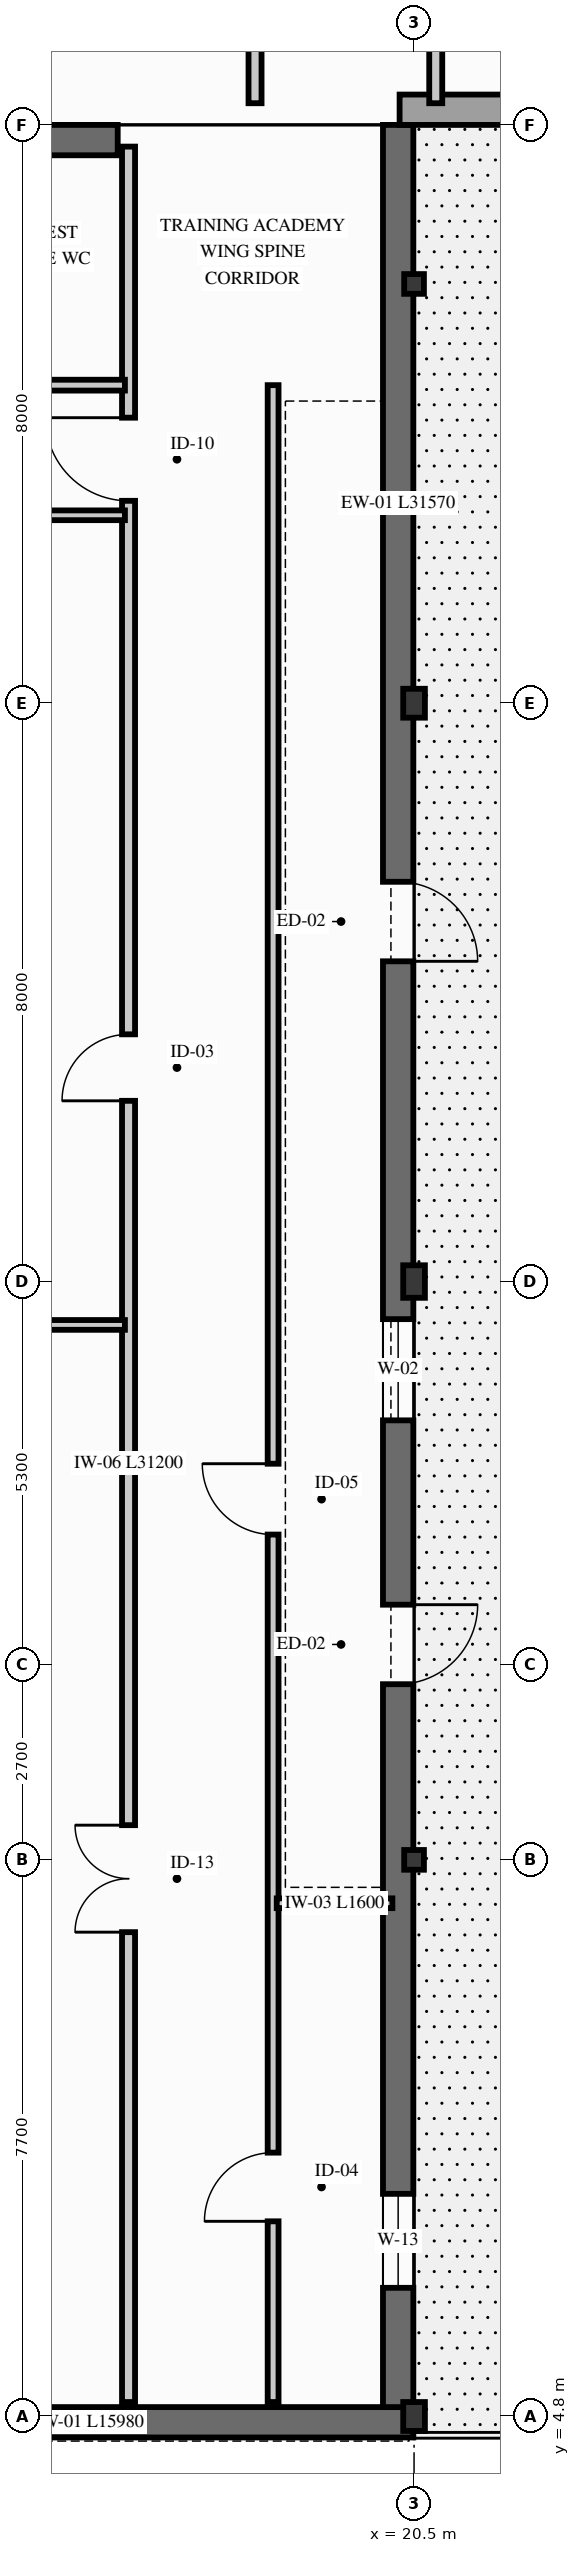
"""IFC4 building model, lengths in metres.
Left out: names, types, materials, properties, quantities, classifications, styles, units other than length and angle.
Written with IfcOpenShell. Run it as: python <this file> out.ifc"""

import sys

from ifc_helpers import new_model, si_unit, direction, frame, frame_2d, origin, origin_2d, place, context, subcontext, project, spatial, rectangle, hollow_circle, i_section, extrude, element, fill, save


model = new_model("IFC4")
c1 = context("Model", 3, precision=1e-05, world=origin(), true_north=direction((0.0, 1.0)))
c2 = subcontext(c1, "Body", "Model", "MODEL_VIEW")
j1 = project(units=[si_unit("LENGTHUNIT", "METRE"), si_unit("PLANEANGLEUNIT", "RADIAN")], contexts=[c1])
p1 = place(None, origin())
s1 = spatial("IfcSite", under=j1, at=p1, CompositionType="ELEMENT")
p2 = place(p1, origin())
s2 = spatial("IfcBuilding", under=s1, at=p2, CompositionType="ELEMENT")
p3 = place(p2, frame((0.0, 0.0, 13.5)))
s3 = spatial("IfcBuildingStorey", under=s2, at=p3, CompositionType="ELEMENT", Elevation=13.5)
p4 = place(p3, frame((20.5, 4.8, 0.0), z_axis=(0.0, 0.0, 1.0), x_axis=(1.0, 0.0, 0.0)))
e1 = element("IfcColumn", 1, at=p4, inside=s3, PredefinedType="COLUMN", context=c2, shape_type="SweptSolid", body=[
    extrude(i_section(OverallWidth=0.3, OverallDepth=0.4, WebThickness=0.013, FlangeThickness=0.024, FilletRadius=0.027, at=origin_2d()), origin(), (0.0, 0.0, 1.0), 3.94),
])
p5 = place(p3, frame((20.5, 12.5, 0.0), z_axis=(0.0, 0.0, 1.0), x_axis=(1.0, 0.0, 0.0)))
e2 = element("IfcColumn", 2, at=p5, inside=s3, PredefinedType="COLUMN", context=c2, shape_type="SweptSolid", body=[
    extrude(hollow_circle(Radius=0.136, WallThickness=0.012, at=origin_2d()), origin(), (0.0, 0.0, 1.0), 3.94),
])
p6 = place(p3, frame((20.5, 20.5, 0.0), z_axis=(0.0, 0.0, 1.0), x_axis=(1.0, 0.0, 0.0)))
e3 = element("IfcColumn", 3, at=p6, inside=s3, PredefinedType="COLUMN", context=c2, shape_type="SweptSolid", body=[
    extrude(i_section(OverallWidth=0.3, OverallDepth=0.45, WebThickness=0.014, FlangeThickness=0.026, FilletRadius=0.027, at=origin_2d()), origin(), (0.0, 0.0, 1.0), 3.94),
])
p7 = place(p3, frame((20.5, 28.5, 0.0), z_axis=(0.0, 0.0, 1.0), x_axis=(1.0, 0.0, 0.0)))
e4 = element("IfcColumn", 4, at=p7, inside=s3, PredefinedType="COLUMN", context=c2, shape_type="SweptSolid", body=[
    extrude(i_section(OverallWidth=0.3, OverallDepth=0.4, WebThickness=0.013, FlangeThickness=0.024, FilletRadius=0.027, at=origin_2d()), origin(), (0.0, 0.0, 1.0), 3.94),
])
p8 = place(p3, frame((20.5, 34.3, 0.0), z_axis=(0.0, 0.0, 1.0), x_axis=(1.0, 0.0, 0.0)))
e5 = element("IfcColumn", 5, at=p8, inside=s3, PredefinedType="COLUMN", context=c2, shape_type="SweptSolid", body=[
    extrude(hollow_circle(Radius=0.136, WallThickness=0.012, at=origin_2d()), origin(), (0.0, 0.0, 1.0), 3.94),
])
p9 = place(p3, frame((4.51, 4.72, 0.0), z_axis=(0.0, 0.0, 1.0), x_axis=(1.0, 0.0, 0.0)))
e6 = element("IfcWall", 6, at=p9, inside=s3, PredefinedType="SOLIDWALL", context=c2, shape_type="SweptSolid", body=[
    extrude(rectangle(XDim=15.98, YDim=0.42, at=frame_2d((7.99, 0.0))), origin(), (0.0, 0.0, 1.0), 3.9),
])
p10 = place(p9, frame((1.65, 0.0, 0.85)))
e7 = element("IfcOpeningElement", 7, at=p10, cuts=e6, PredefinedType="OPENING", context=c2, shape_type="SweptSolid", body=[
    extrude(rectangle(XDim=1.3, YDim=2.15, at=frame_2d((0.65, 1.075))), frame((0.0, 0.22, 0.0), z_axis=(0.0, -1.0, 0.0), x_axis=(1.0, 0.0, 0.0)), (0.0, 0.0, 1.0), 0.44),
])
p11 = place(p9, frame((5.45, 0.0, 0.85)))
e8 = element("IfcOpeningElement", 8, at=p11, cuts=e6, PredefinedType="OPENING", context=c2, shape_type="SweptSolid", body=[
    extrude(rectangle(XDim=1.5, YDim=2.3, at=frame_2d((0.75, 1.15))), frame((0.0, 0.22, 0.0), z_axis=(0.0, -1.0, 0.0), x_axis=(1.0, 0.0, 0.0)), (0.0, 0.0, 1.0), 0.44),
])
p12 = place(p3, frame((20.28, 4.93, 0.0), z_axis=(0.0, 0.0, 1.0), x_axis=(0.0, 1.0, 0.0)))
e9 = element("IfcWall", 9, at=p12, inside=s3, PredefinedType="SOLIDWALL", context=c2, shape_type="SweptSolid", body=[
    extrude(rectangle(XDim=31.57, YDim=0.42, at=frame_2d((15.785, 0.0))), origin(), (0.0, 0.0, 1.0), 3.9),
])
p13 = place(p12, frame((11.1, 0.0, 0.0), z_axis=(0.0, 0.0, 1.0), x_axis=(-1.0, 0.0, 0.0)))
e10 = element("IfcOpeningElement", 10, at=p13, cuts=e9, PredefinedType="OPENING", context=c2, shape_type="SweptSolid", body=[
    extrude(rectangle(XDim=1.1, YDim=2.25, at=frame_2d((0.55, 1.125))), frame((0.0, 0.22, 0.0), z_axis=(0.0, -1.0, 0.0), x_axis=(1.0, 0.0, 0.0)), (0.0, 0.0, 1.0), 0.44),
])
p14 = place(p12, frame((21.1, 0.0, 0.0), z_axis=(0.0, 0.0, 1.0), x_axis=(-1.0, 0.0, 0.0)))
e11 = element("IfcOpeningElement", 11, at=p14, cuts=e9, PredefinedType="OPENING", context=c2, shape_type="SweptSolid", body=[
    extrude(rectangle(XDim=1.1, YDim=2.25, at=frame_2d((0.55, 1.125))), frame((0.0, 0.22, 0.0), z_axis=(0.0, -1.0, 0.0), x_axis=(1.0, 0.0, 0.0)), (0.0, 0.0, 1.0), 0.44),
])
p15 = place(p12, frame((1.65, 0.0, 0.85)))
e12 = element("IfcOpeningElement", 12, at=p15, cuts=e9, PredefinedType="OPENING", context=c2, shape_type="SweptSolid", body=[
    extrude(rectangle(XDim=1.3, YDim=2.15, at=frame_2d((0.65, 1.075))), frame((0.0, 0.22, 0.0), z_axis=(0.0, -1.0, 0.0), x_axis=(1.0, 0.0, 0.0)), (0.0, 0.0, 1.0), 0.44),
])
p16 = place(p12, frame((13.65, 0.0, 0.85)))
e13 = element("IfcOpeningElement", 13, at=p16, cuts=e9, PredefinedType="OPENING", context=c2, shape_type="SweptSolid", body=[
    extrude(rectangle(XDim=1.4, YDim=2.2, at=frame_2d((0.7, 1.1))), frame((0.0, 0.22, 0.0), z_axis=(0.0, -1.0, 0.0), x_axis=(1.0, 0.0, 0.0)), (0.0, 0.0, 1.0), 0.44),
])
p17 = place(p3, frame((4.72, 36.29, 0.0), z_axis=(0.0, 0.0, 1.0), x_axis=(1.0, 0.0, 0.0)))
e14 = element("IfcWall", 14, at=p17, inside=s3, PredefinedType="SOLIDWALL", context=c2, shape_type="SweptSolid", body=[
    extrude(rectangle(XDim=11.68, YDim=0.42, at=frame_2d((5.84, 0.0))), origin(), (0.0, 0.0, 1.0), 3.9),
])
p18 = place(p3, frame((20.3, 36.71, 0.0), z_axis=(0.0, 0.0, 1.0), x_axis=(1.0, 0.0, 0.0)))
e15 = element("IfcWall", 15, at=p18, inside=s3, PredefinedType="SOLIDWALL", context=c2, shape_type="SweptSolid", body=[
    extrude(rectangle(XDim=7.98, YDim=0.42, at=frame_2d((3.99, 0.0))), origin(), (0.0, 0.0, 1.0), 3.9),
])
p19 = place(p18, frame((4.3, 0.0, 0.0), z_axis=(0.0, 0.0, 1.0), x_axis=(-1.0, 0.0, 0.0)))
e16 = element("IfcOpeningElement", 16, at=p19, cuts=e15, PredefinedType="OPENING", context=c2, shape_type="SweptSolid", body=[
    extrude(rectangle(XDim=1.1, YDim=2.25, at=frame_2d((0.55, 1.125))), frame((0.0, 0.22, 0.0), z_axis=(0.0, -1.0, 0.0), x_axis=(1.0, 0.0, 0.0)), (0.0, 0.0, 1.0), 0.44),
])
p20 = place(p3, frame((18.3, 36.8, 0.0), z_axis=(0.0, 0.0, 1.0), x_axis=(0.0, 1.0, 0.0)))
e17 = element("IfcWall", 17, at=p20, inside=s3, PredefinedType="PARTITIONING", context=c2, shape_type="SweptSolid", body=[
    extrude(rectangle(XDim=35.95, YDim=0.18, at=frame_2d((17.975, 0.0))), origin(), (0.0, 0.0, 1.0), 3.718),
])
p21 = place(p20, frame((7.0, 0.0, 0.0)))
e18 = element("IfcOpeningElement", 18, at=p21, cuts=e17, PredefinedType="OPENING", context=c2, shape_type="SweptSolid", body=[
    extrude(rectangle(XDim=1.02, YDim=2.18, at=frame_2d((0.51, 1.09))), frame((0.0, 0.1, 0.0), z_axis=(0.0, -1.0, 0.0), x_axis=(1.0, 0.0, 0.0)), (0.0, 0.0, 1.0), 0.2),
])
p22 = place(p20, frame((22.0, 0.0, 0.0)))
e19 = element("IfcOpeningElement", 19, at=p22, cuts=e17, PredefinedType="OPENING", context=c2, shape_type="SweptSolid", body=[
    extrude(rectangle(XDim=1.05, YDim=2.2, at=frame_2d((0.525, 1.1))), frame((0.0, 0.1, 0.0), z_axis=(0.0, -1.0, 0.0), x_axis=(1.0, 0.0, 0.0)), (0.0, 0.0, 1.0), 0.2),
])
p23 = place(p3, frame((20.8, 36.8, 0.0), z_axis=(0.0, 0.0, 1.0), x_axis=(0.0, 1.0, 0.0)))
e20 = element("IfcWall", 20, at=p23, inside=s3, PredefinedType="PARTITIONING", context=c2, shape_type="SweptSolid", body=[
    extrude(rectangle(XDim=38.05, YDim=0.18, at=frame_2d((19.025, 0.0))), origin(), (0.0, 0.0, 1.0), 3.718),
])
p24 = place(p23, frame((5.65, 0.0, 0.0)))
e21 = element("IfcOpeningElement", 21, at=p24, cuts=e20, PredefinedType="OPENING", context=c2, shape_type="SweptSolid", body=[
    extrude(rectangle(XDim=1.08, YDim=2.22, at=frame_2d((0.54, 1.11))), frame((0.0, 0.1, 0.0), z_axis=(0.0, -1.0, 0.0), x_axis=(1.0, 0.0, 0.0)), (0.0, 0.0, 1.0), 0.2),
])
p25 = place(p23, frame((20.0, 0.0, 0.0)))
e22 = element("IfcOpeningElement", 22, at=p25, cuts=e20, PredefinedType="OPENING", context=c2, shape_type="SweptSolid", body=[
    extrude(rectangle(XDim=1.05, YDim=2.2, at=frame_2d((0.525, 1.1))), frame((0.0, 0.1, 0.0), z_axis=(0.0, -1.0, 0.0), x_axis=(1.0, 0.0, 0.0)), (0.0, 0.0, 1.0), 0.2),
])
p26 = place(p3, frame((16.55, 5.0, 0.0), z_axis=(0.0, 0.0, 1.0), x_axis=(0.0, 1.0, 0.0)))
e23 = element("IfcWall", 23, at=p26, inside=s3, PredefinedType="PARTITIONING", context=c2, shape_type="SweptSolid", body=[
    extrude(rectangle(XDim=31.2, YDim=0.18, at=frame_2d((15.6, 0.0))), origin(), (0.0, 0.0, 1.0), 3.478),
])
p27 = place(p26, frame((6.5, 0.0, 0.0)))
e24 = element("IfcOpeningElement", 24, at=p27, cuts=e23, PredefinedType="OPENING", context=c2, shape_type="SweptSolid", body=[
    extrude(rectangle(XDim=1.48, YDim=2.28, at=frame_2d((0.74, 1.14))), frame((0.0, 0.1, 0.0), z_axis=(0.0, -1.0, 0.0), x_axis=(1.0, 0.0, 0.0)), (0.0, 0.0, 1.0), 0.2),
])
p28 = place(p26, frame((18.0, 0.0, 0.0)))
e25 = element("IfcOpeningElement", 25, at=p28, cuts=e23, PredefinedType="OPENING", context=c2, shape_type="SweptSolid", body=[
    extrude(rectangle(XDim=0.92, YDim=2.12, at=frame_2d((0.46, 1.06))), frame((0.0, 0.1, 0.0), z_axis=(0.0, -1.0, 0.0), x_axis=(1.0, 0.0, 0.0)), (0.0, 0.0, 1.0), 0.2),
])
p29 = place(p26, frame((26.3, 0.0, 0.0)))
e26 = element("IfcOpeningElement", 26, at=p29, cuts=e23, PredefinedType="OPENING", context=c2, shape_type="SweptSolid", body=[
    extrude(rectangle(XDim=1.15, YDim=2.2, at=frame_2d((0.575, 1.1))), frame((0.0, 0.1, 0.0), z_axis=(0.0, -1.0, 0.0), x_axis=(1.0, 0.0, 0.0)), (0.0, 0.0, 1.0), 0.2),
])
p30 = place(p3, frame((18.55, 5.0, 0.0), z_axis=(0.0, 0.0, 1.0), x_axis=(0.0, 1.0, 0.0)))
e27 = element("IfcWall", 27, at=p30, inside=s3, PredefinedType="PARTITIONING", context=c2, shape_type="SweptSolid", body=[
    extrude(rectangle(XDim=27.9, YDim=0.15, at=frame_2d((13.95, 0.0))), origin(), (0.0, 0.0, 1.0), 3.98),
])
p31 = place(p30, frame((2.5, 0.0, 0.0)))
e28 = element("IfcOpeningElement", 28, at=p31, cuts=e27, PredefinedType="OPENING", context=c2, shape_type="SweptSolid", body=[
    extrude(rectangle(XDim=0.95, YDim=2.15, at=frame_2d((0.475, 1.075))), frame((0.0, 0.085, 0.0), z_axis=(0.0, -1.0, 0.0), x_axis=(1.0, 0.0, 0.0)), (0.0, 0.0, 1.0), 0.17),
])
p32 = place(p30, frame((12.0, 0.0, 0.0)))
e29 = element("IfcOpeningElement", 29, at=p32, cuts=e27, PredefinedType="OPENING", context=c2, shape_type="SweptSolid", body=[
    extrude(rectangle(XDim=0.98, YDim=2.16, at=frame_2d((0.49, 1.08))), frame((0.0, 0.085, 0.0), z_axis=(0.0, -1.0, 0.0), x_axis=(1.0, 0.0, 0.0)), (0.0, 0.0, 1.0), 0.17),
])
p33 = place(p3, frame((5.0, 19.9, 0.0), z_axis=(0.0, 0.0, 1.0), x_axis=(1.0, 0.0, 0.0)))
e30 = element("IfcWall", 30, at=p33, inside=s3, PredefinedType="PARTITIONING", context=c2, shape_type="SweptSolid", body=[
    extrude(rectangle(XDim=11.5, YDim=0.135, at=frame_2d((5.75, 0.0))), origin(), (0.0, 0.0, 1.0), 3.378),
])
p34 = place(p3, frame((18.6, 11.9, 0.0), z_axis=(0.0, 0.0, 1.0), x_axis=(1.0, 0.0, 0.0)))
e31 = element("IfcWall", 31, at=p34, inside=s3, PredefinedType="PARTITIONING", context=c2, shape_type="SweptSolid", body=[
    extrude(rectangle(XDim=1.6, YDim=0.135, at=frame_2d((0.8, 0.0))), origin(), (0.0, 0.0, 1.0), 3.98),
])
p35 = place(p3, frame((5.0, 32.9, 0.0), z_axis=(0.0, 0.0, 1.0), x_axis=(1.0, 0.0, 0.0)))
e32 = element("IfcWall", 32, at=p35, inside=s3, PredefinedType="PARTITIONING", context=c2, shape_type="SweptSolid", body=[
    extrude(rectangle(XDim=11.5, YDim=0.15, at=frame_2d((5.75, 0.0))), origin(), (0.0, 0.0, 1.0), 3.378),
])
p36 = place(p35, frame((2.0, 0.0, 0.0)))
e33 = element("IfcOpeningElement", 33, at=p36, cuts=e32, PredefinedType="OPENING", context=c2, shape_type="SweptSolid", body=[
    extrude(rectangle(XDim=0.88, YDim=2.1, at=frame_2d((0.44, 1.05))), frame((0.0, 0.085, 0.0), z_axis=(0.0, -1.0, 0.0), x_axis=(1.0, 0.0, 0.0)), (0.0, 0.0, 1.0), 0.17),
])
p37 = place(p35, frame((8.4, 0.0, 0.0)))
e34 = element("IfcOpeningElement", 34, at=p37, cuts=e32, PredefinedType="OPENING", context=c2, shape_type="SweptSolid", body=[
    extrude(rectangle(XDim=0.9, YDim=2.1, at=frame_2d((0.45, 1.05))), frame((0.0, 0.085, 0.0), z_axis=(0.0, -1.0, 0.0), x_axis=(1.0, 0.0, 0.0)), (0.0, 0.0, 1.0), 0.17),
])
p38 = place(p3, frame((5.0, 31.1, 0.0), z_axis=(0.0, 0.0, 1.0), x_axis=(1.0, 0.0, 0.0)))
e35 = element("IfcWall", 35, at=p38, inside=s3, PredefinedType="PARTITIONING", context=c2, shape_type="SweptSolid", body=[
    extrude(rectangle(XDim=11.5, YDim=0.135, at=frame_2d((5.75, 0.0))), origin(), (0.0, 0.0, 1.0), 3.378),
])
p39 = place(p13, origin())
e36 = element("IfcDoor", 36, at=p39, inside=s3, OperationType="SINGLE_SWING_LEFT", PredefinedType="DOOR", context=c2, shape_type="SweptSolid", body=[
    extrude(rectangle(XDim=1.1, YDim=2.25, at=frame_2d((0.55, 1.125))), frame((0.0, 0.025, 0.0), z_axis=(0.0, -1.0, 0.0), x_axis=(1.0, 0.0, 0.0)), (0.0, 0.0, 1.0), 0.05),
])
fill(e10, e36)
p40 = place(p14, origin())
e37 = element("IfcDoor", 37, at=p40, inside=s3, OperationType="SINGLE_SWING_RIGHT", PredefinedType="DOOR", context=c2, shape_type="SweptSolid", body=[
    extrude(rectangle(XDim=1.1, YDim=2.25, at=frame_2d((0.55, 1.125))), frame((0.0, 0.025, 0.0), z_axis=(0.0, -1.0, 0.0), x_axis=(1.0, 0.0, 0.0)), (0.0, 0.0, 1.0), 0.05),
])
fill(e11, e37)
p41 = place(p15, origin())
e38 = element("IfcWindow", 38, at=p41, inside=s3, PartitioningType="SINGLE_PANEL", PredefinedType="WINDOW", context=c2, shape_type="SweptSolid", body=[
    extrude(rectangle(XDim=1.3, YDim=2.15, at=frame_2d((0.65, 1.075))), frame((0.0, 0.03, 0.0), z_axis=(0.0, -1.0, 0.0), x_axis=(1.0, 0.0, 0.0)), (0.0, 0.0, 1.0), 0.06),
])
fill(e12, e38)
p42 = place(p16, origin())
e39 = element("IfcWindow", 39, at=p42, inside=s3, PartitioningType="SINGLE_PANEL", PredefinedType="WINDOW", context=c2, shape_type="SweptSolid", body=[
    extrude(rectangle(XDim=1.4, YDim=2.2, at=frame_2d((0.7, 1.1))), frame((0.0, 0.03, 0.0), z_axis=(0.0, -1.0, 0.0), x_axis=(1.0, 0.0, 0.0)), (0.0, 0.0, 1.0), 0.06),
])
fill(e13, e39)
p43 = place(p3, frame((12.556, 29.195, 6.319), z_axis=(0.281259054176, 0.0, 0.959631879652), x_axis=(0.726249140985, 0.653646830346, -0.212856774375)))
p44 = place(p43, frame((-2.573, -9.267, 0.0)))
p45 = place(p44, frame((0.0, 0.0, 0.02)))
e40 = element("IfcWindow", 40, at=p45, inside=s3, PartitioningType="SINGLE_PANEL", PredefinedType="SKYLIGHT", context=c2, shape_type="SweptSolid", body=[
    extrude(rectangle(XDim=2.0, YDim=2.4, at=origin_2d()), origin(), (0.0, 0.0, 1.0), 0.08),
])
p46 = place(p27, origin())
e41 = element("IfcDoor", 41, at=p46, inside=s3, OperationType="DOUBLE_DOOR_SINGLE_SWING", PredefinedType="DOOR", context=c2, shape_type="SweptSolid", body=[
    extrude(rectangle(XDim=1.48, YDim=2.28, at=frame_2d((0.74, 1.14))), frame((0.0, 0.025, 0.0), z_axis=(0.0, -1.0, 0.0), x_axis=(1.0, 0.0, 0.0)), (0.0, 0.0, 1.0), 0.05),
])
fill(e24, e41)
p47 = place(p28, origin())
e42 = element("IfcDoor", 42, at=p47, inside=s3, OperationType="SINGLE_SWING_LEFT", PredefinedType="DOOR", context=c2, shape_type="SweptSolid", body=[
    extrude(rectangle(XDim=0.92, YDim=2.12, at=frame_2d((0.46, 1.06))), frame((0.0, 0.025, 0.0), z_axis=(0.0, -1.0, 0.0), x_axis=(1.0, 0.0, 0.0)), (0.0, 0.0, 1.0), 0.05),
])
fill(e25, e42)
p48 = place(p29, origin())
e43 = element("IfcDoor", 43, at=p48, inside=s3, OperationType="SINGLE_SWING_RIGHT", PredefinedType="DOOR", context=c2, shape_type="SweptSolid", body=[
    extrude(rectangle(XDim=1.15, YDim=2.2, at=frame_2d((0.575, 1.1))), frame((0.0, 0.025, 0.0), z_axis=(0.0, -1.0, 0.0), x_axis=(1.0, 0.0, 0.0)), (0.0, 0.0, 1.0), 0.05),
])
fill(e26, e43)
p49 = place(p31, origin())
e44 = element("IfcDoor", 44, at=p49, inside=s3, OperationType="SINGLE_SWING_LEFT", PredefinedType="DOOR", context=c2, shape_type="SweptSolid", body=[
    extrude(rectangle(XDim=0.95, YDim=2.15, at=frame_2d((0.475, 1.075))), frame((0.0, 0.025, 0.0), z_axis=(0.0, -1.0, 0.0), x_axis=(1.0, 0.0, 0.0)), (0.0, 0.0, 1.0), 0.05),
])
fill(e28, e44)
p50 = place(p32, origin())
e45 = element("IfcDoor", 45, at=p50, inside=s3, OperationType="SINGLE_SWING_RIGHT", PredefinedType="DOOR", context=c2, shape_type="SweptSolid", body=[
    extrude(rectangle(XDim=0.98, YDim=2.16, at=frame_2d((0.49, 1.08))), frame((0.0, 0.025, 0.0), z_axis=(0.0, -1.0, 0.0), x_axis=(1.0, 0.0, 0.0)), (0.0, 0.0, 1.0), 0.05),
])
fill(e29, e45)
save(model, sys.argv[1])
